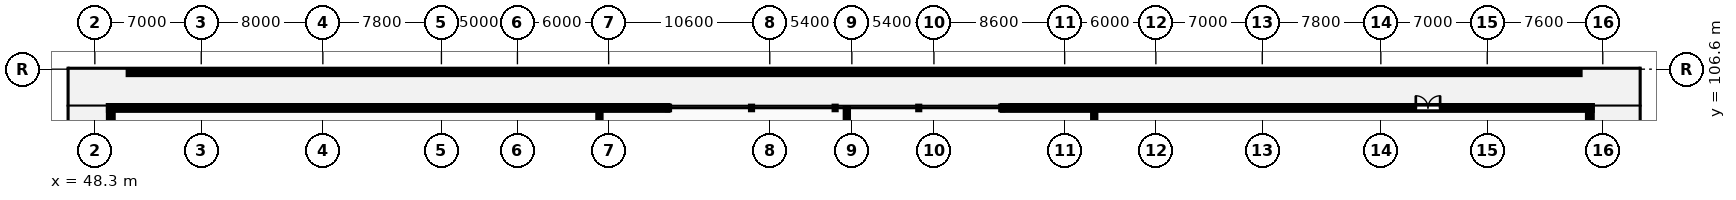
"""IFC4 building model, lengths in metres.
Left out: names, types, materials, properties, quantities, classifications, styles, units other than length and angle.
Written with IfcOpenShell. Run it as: python <this file> out.ifc"""

import sys

from ifc_helpers import new_model, si_unit, direction, frame, frame_2d, origin, place, context, subcontext, project, spatial, rectangle, extrude, element, fill, save


model = new_model("IFC4")
c1 = context("Model", 3, precision=1e-05, world=origin(), true_north=direction((0.0, 1.0)))
c2 = subcontext(c1, "Body", "Model", "MODEL_VIEW")
j1 = project(units=[si_unit("LENGTHUNIT", "METRE"), si_unit("PLANEANGLEUNIT", "RADIAN")], contexts=[c1])
p1 = place(None, origin())
s1 = spatial("IfcSite", under=j1, at=p1, CompositionType="ELEMENT")
p2 = place(p1, origin())
s2 = spatial("IfcBuilding", under=s1, at=p2, CompositionType="ELEMENT")
p3 = place(p2, frame((0.0, 0.0, 10.0)))
s3 = spatial("IfcBuildingStorey", under=s2, at=p3, CompositionType="ELEMENT", Elevation=10.0)
p4 = place(p3, frame((146.8, 104.05, 0.0), z_axis=(0.0, 0.0, 1.0), x_axis=(-1.0, 0.0, 0.0)))
e1 = element("IfcWall", 1, at=p4, inside=s3, PredefinedType="STANDARD", context=c2, shape_type="SweptSolid", body=[
    extrude(rectangle(XDim=38.8, YDim=0.3, at=frame_2d((19.4, 0.0))), origin(), (0.0, 0.0, 1.0), 4.2),
])
p5 = place(p4, frame((10.0, 0.0, 0.0)))
e2 = element("IfcOpeningElement", 2, at=p5, cuts=e1, PredefinedType="OPENING", context=c2, shape_type="SweptSolid", body=[
    extrude(rectangle(XDim=1.6, YDim=2.2, at=frame_2d((0.8, 1.1))), frame((0.0, 0.16, 0.0), z_axis=(0.0, -1.0, 0.0), x_axis=(1.0, 0.0, 0.0)), (0.0, 0.0, 1.0), 0.32),
])
p6 = place(p3, frame((86.0, 104.05, 0.0), z_axis=(0.0, 0.0, 1.0), x_axis=(-1.0, 0.0, 0.0)))
e3 = element("IfcWall", 3, at=p6, inside=s3, PredefinedType="STANDARD", context=c2, shape_type="SweptSolid", body=[
    extrude(rectangle(XDim=36.8, YDim=0.3, at=frame_2d((18.4, 0.0))), origin(), (0.0, 0.0, 1.0), 4.2),
])
p7 = place(p3, frame((49.35, 104.2, 0.0), z_axis=(0.0, 0.0, 1.0), x_axis=(0.0, -1.0, 0.0)))
e4 = element("IfcWall", 4, at=p7, inside=s3, PredefinedType="STANDARD", context=c2, shape_type="SweptSolid", body=[
    extrude(rectangle(XDim=124.7, YDim=0.3, at=frame_2d((62.35, 0.0))), origin(), (0.0, 0.0, 1.0), 4.2),
])
p8 = place(p7, frame((12.0, 0.0, 0.0)))
e5 = element("IfcOpeningElement", 5, at=p8, cuts=e4, PredefinedType="OPENING", context=c2, shape_type="SweptSolid", body=[
    extrude(rectangle(XDim=1.6, YDim=2.2, at=frame_2d((0.8, 1.1))), frame((0.0, 0.16, 0.0), z_axis=(0.0, -1.0, 0.0), x_axis=(1.0, 0.0, 0.0)), (0.0, 0.0, 1.0), 0.32),
])
p9 = place(p3, frame((146.65, -20.5, 0.0), z_axis=(0.0, 0.0, 1.0), x_axis=(0.0, 1.0, 0.0)))
e6 = element("IfcWall", 6, at=p9, inside=s3, PredefinedType="STANDARD", context=c2, shape_type="SweptSolid", body=[
    extrude(rectangle(XDim=124.7, YDim=0.3, at=frame_2d((62.35, 0.0))), origin(), (0.0, 0.0, 1.0), 4.2),
])
p10 = place(p9, frame((20.0, 0.0, 0.0)))
e7 = element("IfcOpeningElement", 7, at=p10, cuts=e6, PredefinedType="OPENING", context=c2, shape_type="SweptSolid", body=[
    extrude(rectangle(XDim=1.6, YDim=2.2, at=frame_2d((0.8, 1.1))), frame((0.0, 0.16, 0.0), z_axis=(0.0, -1.0, 0.0), x_axis=(1.0, 0.0, 0.0)), (0.0, 0.0, 1.0), 0.32),
])
p11 = place(p3, frame((146.0, 106.35, 0.0), z_axis=(0.0, 0.0, 1.0), x_axis=(-1.0, 0.0, 0.0)))
e8 = element("IfcWall", 8, at=p11, inside=s3, PredefinedType="PARAPET", context=c2, shape_type="SweptSolid", body=[
    extrude(rectangle(XDim=95.5, YDim=0.2, at=frame_2d((47.75, 0.0))), origin(), (0.0, 0.0, 1.0), 0.65),
])
p12 = place(p3, frame((81.495, 67.4, 0.0), z_axis=(0.0, 0.0, 1.0), x_axis=(0.0, 1.0, 0.0)))
e9 = element("IfcWall", 9, at=p12, inside=s3, PredefinedType="PARTITIONING", context=c2, shape_type="SweptSolid", body=[
    extrude(rectangle(XDim=36.62, YDim=0.2, at=frame_2d((18.31, 0.0))), origin(), (0.0, 0.0, 1.0), 4.2),
])
p13 = place(p12, frame((9.5, 0.0, 0.0)))
e10 = element("IfcOpeningElement", 10, at=p13, cuts=e9, PredefinedType="OPENING", context=c2, shape_type="SweptSolid", body=[
    extrude(rectangle(XDim=1.22, YDim=2.18, at=frame_2d((0.61, 1.09))), frame((0.0, 0.11, 0.0), z_axis=(0.0, -1.0, 0.0), x_axis=(1.0, 0.0, 0.0)), (0.0, 0.0, 1.0), 0.22),
])
p14 = place(p3, frame((97.77, 67.4, 0.0), z_axis=(0.0, 0.0, 1.0), x_axis=(0.0, 1.0, 0.0)))
e11 = element("IfcWall", 11, at=p14, inside=s3, PredefinedType="PARTITIONING", context=c2, shape_type="SweptSolid", body=[
    extrude(rectangle(XDim=36.62, YDim=0.2, at=frame_2d((18.31, 0.0))), origin(), (0.0, 0.0, 1.0), 4.2),
])
p15 = place(p14, frame((9.5, 0.0, 0.0)))
e12 = element("IfcOpeningElement", 12, at=p15, cuts=e11, PredefinedType="OPENING", context=c2, shape_type="SweptSolid", body=[
    extrude(rectangle(XDim=1.22, YDim=2.18, at=frame_2d((0.61, 1.09))), frame((0.0, 0.11, 0.0), z_axis=(0.0, -1.0, 0.0), x_axis=(1.0, 0.0, 0.0)), (0.0, 0.0, 1.0), 0.22),
])
p16 = place(p3, frame((114.045, 67.4, 0.0), z_axis=(0.0, 0.0, 1.0), x_axis=(0.0, 1.0, 0.0)))
e13 = element("IfcWall", 13, at=p16, inside=s3, PredefinedType="PARTITIONING", context=c2, shape_type="SweptSolid", body=[
    extrude(rectangle(XDim=36.62, YDim=0.2, at=frame_2d((18.31, 0.0))), origin(), (0.0, 0.0, 1.0), 4.2),
])
p17 = place(p16, frame((8.6, 0.0, 0.0)))
e14 = element("IfcOpeningElement", 14, at=p17, cuts=e13, PredefinedType="OPENING", context=c2, shape_type="SweptSolid", body=[
    extrude(rectangle(XDim=1.22, YDim=2.18, at=frame_2d((0.61, 1.09))), frame((0.0, 0.11, 0.0), z_axis=(0.0, -1.0, 0.0), x_axis=(1.0, 0.0, 0.0)), (0.0, 0.0, 1.0), 0.22),
])
p18 = place(p5, frame((1.6, 0.0, 0.0), z_axis=(0.0, 0.0, 1.0), x_axis=(-1.0, 0.0, 0.0)))
e15 = element("IfcDoor", 15, at=p18, inside=s3, OperationType="DOUBLE_DOOR_SINGLE_SWING", PredefinedType="DOOR", context=c2, shape_type="SweptSolid", body=[
    extrude(rectangle(XDim=1.6, YDim=2.2, at=frame_2d((0.8, 1.1))), frame((0.0, 0.025, 0.0), z_axis=(0.0, -1.0, 0.0), x_axis=(1.0, 0.0, 0.0)), (0.0, 0.0, 1.0), 0.05),
])
fill(e2, e15)
save(model, sys.argv[1])
